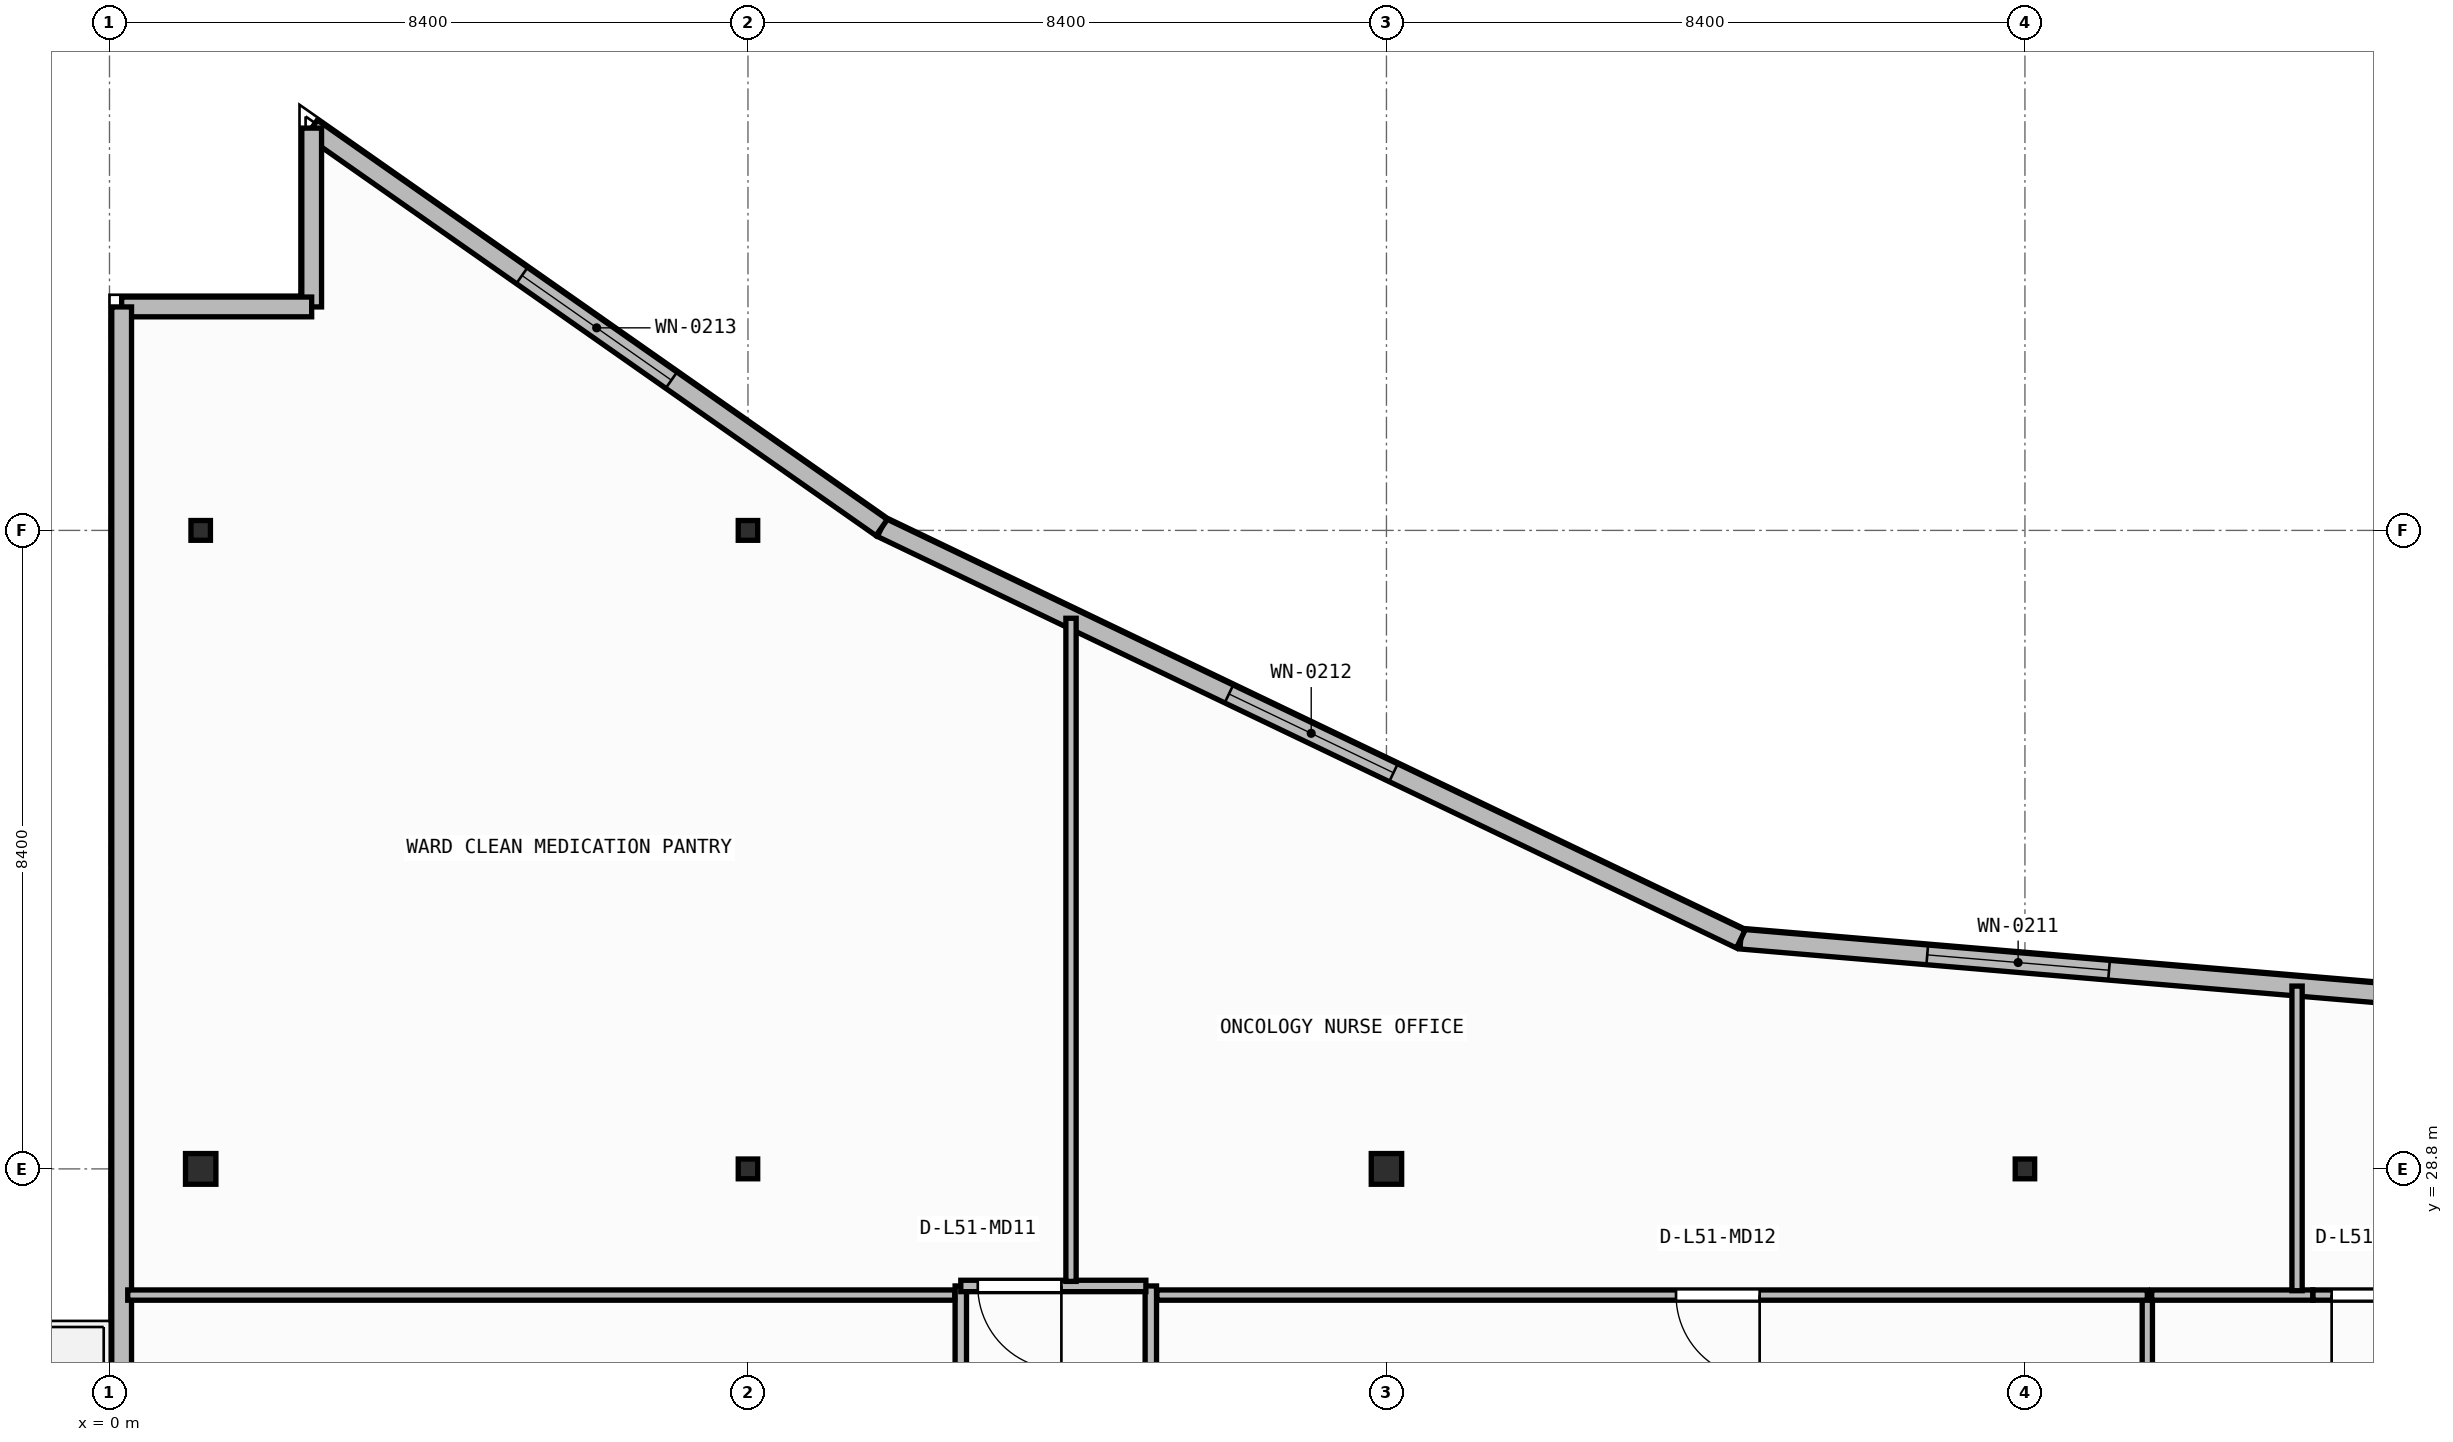
"""IFC4 building model, lengths in metres.
Left out: names, types, materials, properties, quantities, classifications, styles, units other than length and angle.
Written with IfcOpenShell. Run it as: python <this file> out.ifc"""

import sys

from ifc_helpers import new_model, si_unit, direction, frame, frame_2d, origin, origin_2d, place, context, subcontext, project, spatial, rectangle, i_section, extrude, element, fill, save


model = new_model("IFC4")
c1 = context("Model", 3, precision=1e-05, world=origin(), true_north=direction((0.0, 1.0)))
c2 = subcontext(c1, "Body", "Model", "MODEL_VIEW")
j1 = project(units=[si_unit("LENGTHUNIT", "METRE"), si_unit("PLANEANGLEUNIT", "RADIAN")], contexts=[c1])
p1 = place(None, origin())
s1 = spatial("IfcSite", under=j1, at=p1, CompositionType="ELEMENT")
p2 = place(p1, origin())
s2 = spatial("IfcBuilding", under=s1, at=p2, CompositionType="ELEMENT")
p3 = place(p2, frame((0.0, 0.0, 207.9)))
s3 = spatial("IfcBuildingStorey", under=s2, at=p3, CompositionType="ELEMENT", Elevation=207.9)
p4 = place(p3, frame((1.2, 28.8, 0.0), z_axis=(0.0, 0.0, 1.0), x_axis=(1.0, 0.0, 0.0)))
e1 = element("IfcColumn", 1, at=p4, inside=s3, PredefinedType="COLUMN", context=c2, shape_type="SweptSolid", body=[
    extrude(i_section(OverallWidth=0.4, OverallDepth=0.404, WebThickness=0.02, FlangeThickness=0.032, at=origin_2d()), origin(), (0.0, 0.0, 1.0), 3.95),
])
p5 = place(p3, frame((8.4, 28.8, 0.0), z_axis=(0.0, 0.0, 1.0), x_axis=(1.0, 0.0, 0.0)))
e2 = element("IfcColumn", 2, at=p5, inside=s3, PredefinedType="COLUMN", context=c2, shape_type="SweptSolid", body=[
    extrude(i_section(OverallWidth=0.256, OverallDepth=0.26, WebThickness=0.01, FlangeThickness=0.017, FilletRadius=0.013, at=origin_2d()), origin(), (0.0, 0.0, 1.0), 3.95),
])
p6 = place(p3, frame((16.8, 28.8, 0.0), z_axis=(0.0, 0.0, 1.0), x_axis=(1.0, 0.0, 0.0)))
e3 = element("IfcColumn", 3, at=p6, inside=s3, PredefinedType="COLUMN", context=c2, shape_type="SweptSolid", body=[
    extrude(i_section(OverallWidth=0.4, OverallDepth=0.404, WebThickness=0.02, FlangeThickness=0.032, at=origin_2d()), origin(), (0.0, 0.0, 1.0), 3.95),
])
for number, where, z_axis, x_axis in (
    (4, (25.2, 28.8, 0.0), (0.0, 0.0, 1.0), (1.0, 0.0, 0.0)),
    (5, (1.2, 37.2, 0.0), (0.0, 0.0, 1.0), (1.0, 0.0, 0.0)),
    (6, (8.4, 37.2, 0.0), (0.0, 0.0, 1.0), (1.0, 0.0, 0.0)),
):
    element("IfcColumn", number, at=place(p3, frame(where, z_axis=z_axis, x_axis=x_axis)), inside=s3, PredefinedType="COLUMN", context=c2, shape_type="SweptSolid", body=[
        extrude(i_section(OverallWidth=0.256, OverallDepth=0.26, WebThickness=0.01, FlangeThickness=0.017, FilletRadius=0.013, at=origin_2d()), origin(), (0.0, 0.0, 1.0), 3.95),
    ])
p7 = place(p3, frame((34.815, 30.696, 0.0), z_axis=(0.0, 0.0, 1.0), x_axis=(-0.996454704935, 0.084130975344, 0.0)))
e7 = element("IfcWall", 7, at=p7, inside=s3, PredefinedType="STANDARD", context=c2, shape_type="SweptSolid", body=[
    extrude(rectangle(XDim=13.401, YDim=0.26, at=frame_2d((6.701, 0.0))), origin(), (0.0, 0.0, 1.0), 3.71),
])
p8 = place(p7, frame((8.539, 0.0, 0.9)))
e8 = element("IfcOpeningElement", 8, at=p8, cuts=e7, PredefinedType="OPENING", context=c2, shape_type="SweptSolid", body=[
    extrude(rectangle(XDim=2.4, YDim=1.65, at=frame_2d((1.2, 0.825))), frame((0.0, 0.14, 0.0), z_axis=(0.0, -1.0, 0.0), x_axis=(1.0, 0.0, 0.0)), (0.0, 0.0, 1.0), 0.28),
])
p9 = place(p3, frame((21.461, 31.823, 0.0), z_axis=(0.0, 0.0, 1.0), x_axis=(-0.901858094827, 0.432032379336, 0.0)))
e9 = element("IfcWall", 9, at=p9, inside=s3, PredefinedType="STANDARD", context=c2, shape_type="SweptSolid", body=[
    extrude(rectangle(XDim=12.532, YDim=0.26, at=frame_2d((6.266, 0.0))), origin(), (0.0, 0.0, 1.0), 3.71),
])
p10 = place(p9, frame((5.066, 0.0, 0.9)))
e10 = element("IfcOpeningElement", 10, at=p10, cuts=e9, PredefinedType="OPENING", context=c2, shape_type="SweptSolid", body=[
    extrude(rectangle(XDim=2.4, YDim=1.65, at=frame_2d((1.2, 0.825))), frame((0.0, 0.14, 0.0), z_axis=(0.0, -1.0, 0.0), x_axis=(1.0, 0.0, 0.0)), (0.0, 0.0, 1.0), 0.28),
])
p11 = place(p3, frame((10.159, 37.237, 0.0), z_axis=(0.0, 0.0, 1.0), x_axis=(-0.818933702389, 0.57388813465, 0.0)))
e11 = element("IfcWall", 11, at=p11, inside=s3, PredefinedType="STANDARD", context=c2, shape_type="SweptSolid", body=[
    extrude(rectangle(XDim=9.157, YDim=0.26, at=frame_2d((4.579, 0.0))), origin(), (0.0, 0.0, 1.0), 3.71),
])
p12 = place(p11, frame((3.378, 0.0, 0.9)))
e12 = element("IfcOpeningElement", 12, at=p12, cuts=e11, PredefinedType="OPENING", context=c2, shape_type="SweptSolid", body=[
    extrude(rectangle(XDim=2.4, YDim=1.65, at=frame_2d((1.2, 0.825))), frame((0.0, 0.14, 0.0), z_axis=(0.0, -1.0, 0.0), x_axis=(1.0, 0.0, 0.0)), (0.0, 0.0, 1.0), 0.28),
])
p13 = place(p3, frame((2.66, 42.492, 0.0), z_axis=(0.0, 0.0, 1.0), x_axis=(0.0, -1.0, 0.0)))
e13 = element("IfcWall", 13, at=p13, inside=s3, PredefinedType="STANDARD", context=c2, shape_type="SweptSolid", body=[
    extrude(rectangle(XDim=2.353, YDim=0.26, at=frame_2d((1.176, 0.0))), origin(), (0.0, 0.0, 1.0), 3.71),
])
p14 = place(p3, frame((2.66, 40.14, 0.0), z_axis=(0.0, 0.0, 1.0), x_axis=(-1.0, 0.0, 0.0)))
e14 = element("IfcWall", 14, at=p14, inside=s3, PredefinedType="STANDARD", context=c2, shape_type="SweptSolid", body=[
    extrude(rectangle(XDim=2.5, YDim=0.26, at=frame_2d((1.25, 0.0))), origin(), (0.0, 0.0, 1.0), 3.71),
])
p15 = place(p3, frame((0.16, 40.14, 0.0), z_axis=(0.0, 0.0, 1.0), x_axis=(0.0, -1.0, 0.0)))
e15 = element("IfcWall", 15, at=p15, inside=s3, PredefinedType="STANDARD", context=c2, shape_type="SweptSolid", body=[
    extrude(rectangle(XDim=37.48, YDim=0.26, at=frame_2d((18.74, 0.0))), origin(), (0.0, 0.0, 1.0), 3.71),
])
p16 = place(p15, frame((13.926, 0.0, 0.0)))
e16 = element("IfcOpeningElement", 16, at=p16, cuts=e15, PredefinedType="OPENING", context=c2, shape_type="SweptSolid", body=[
    extrude(rectangle(XDim=1.3, YDim=2.15, at=frame_2d((0.65, 1.075))), frame((0.0, 0.14, 0.0), z_axis=(0.0, -1.0, 0.0), x_axis=(1.0, 0.0, 0.0)), (0.0, 0.0, 1.0), 0.28),
])
p17 = place(p3, frame((11.2, 27.26, 0.0), z_axis=(0.0, 0.0, 1.0), x_axis=(0.0, -1.0, 0.0)))
e17 = element("IfcWall", 17, at=p17, inside=s3, PredefinedType="PARTITIONING", context=c2, shape_type="SweptSolid", body=[
    extrude(rectangle(XDim=6.592, YDim=0.15, at=frame_2d((3.296, 0.0))), origin(), (0.0, 0.0, 1.0), 3.71),
])
p18 = place(p17, frame((2.746, 0.0, 0.0)))
e18 = element("IfcOpeningElement", 18, at=p18, cuts=e17, PredefinedType="OPENING", context=c2, shape_type="SweptSolid", body=[
    extrude(rectangle(XDim=1.1, YDim=2.1, at=frame_2d((0.55, 1.05))), frame((0.0, 0.085, 0.0), z_axis=(0.0, -1.0, 0.0), x_axis=(1.0, 0.0, 0.0)), (0.0, 0.0, 1.0), 0.17),
])
p19 = place(p3, frame((13.7, 20.668, 0.0), z_axis=(0.0, 0.0, 1.0), x_axis=(0.0, 1.0, 0.0)))
e19 = element("IfcWall", 19, at=p19, inside=s3, PredefinedType="PARTITIONING", context=c2, shape_type="SweptSolid", body=[
    extrude(rectangle(XDim=6.592, YDim=0.15, at=frame_2d((3.296, 0.0))), origin(), (0.0, 0.0, 1.0), 3.71),
])
p20 = place(p19, frame((2.746, 0.0, 0.0)))
e20 = element("IfcOpeningElement", 20, at=p20, cuts=e19, PredefinedType="OPENING", context=c2, shape_type="SweptSolid", body=[
    extrude(rectangle(XDim=1.1, YDim=2.1, at=frame_2d((0.55, 1.05))), frame((0.0, 0.085, 0.0), z_axis=(0.0, -1.0, 0.0), x_axis=(1.0, 0.0, 0.0)), (0.0, 0.0, 1.0), 0.17),
])
p21 = place(p3, frame((13.635, 27.26, 0.0), z_axis=(0.0, 0.0, 1.0), x_axis=(-1.0, 0.0, 0.0)))
e21 = element("IfcWall", 21, at=p21, inside=s3, PredefinedType="PARTITIONING", context=c2, shape_type="SweptSolid", body=[
    extrude(rectangle(XDim=2.435, YDim=0.15, at=frame_2d((1.218, 0.0))), origin(), (0.0, 0.0, 1.0), 3.71),
])
p22 = place(p21, frame((1.112, 0.0, 0.0)))
e22 = element("IfcOpeningElement", 22, at=p22, cuts=e21, PredefinedType="OPENING", context=c2, shape_type="SweptSolid", body=[
    extrude(rectangle(XDim=1.1, YDim=2.1, at=frame_2d((0.55, 1.05))), frame((0.0, 0.085, 0.0), z_axis=(0.0, -1.0, 0.0), x_axis=(1.0, 0.0, 0.0)), (0.0, 0.0, 1.0), 0.17),
])
p23 = place(p3, frame((11.12, 27.14, 0.0), z_axis=(0.0, 0.0, 1.0), x_axis=(-1.0, 0.0, 0.0)))
e23 = element("IfcWall", 23, at=p23, inside=s3, PredefinedType="PARTITIONING", context=c2, shape_type="SweptSolid", body=[
    extrude(rectangle(XDim=10.88, YDim=0.135, at=frame_2d((5.44, 0.0))), origin(), (0.0, 0.0, 1.0), 3.71),
])
p24 = place(p3, frame((26.81, 20.498, 0.0), z_axis=(0.0, 0.0, 1.0), x_axis=(0.0, 1.0, 0.0)))
e24 = element("IfcWall", 24, at=p24, inside=s3, PredefinedType="PARTITIONING", context=c2, shape_type="SweptSolid", body=[
    extrude(rectangle(XDim=6.642, YDim=0.135, at=frame_2d((3.321, 0.0))), origin(), (0.0, 0.0, 1.0), 3.71),
])
p25 = place(p3, frame((26.81, 27.14, 0.0), z_axis=(0.0, 0.0, 1.0), x_axis=(-1.0, 0.0, 0.0)))
e25 = element("IfcWall", 25, at=p25, inside=s3, PredefinedType="PARTITIONING", context=c2, shape_type="SweptSolid", body=[
    extrude(rectangle(XDim=13.03, YDim=0.135, at=frame_2d((6.515, 0.0))), origin(), (0.0, 0.0, 1.0), 3.71),
])
p26 = place(p25, frame((5.1, 0.0, 0.0)))
e26 = element("IfcOpeningElement", 26, at=p26, cuts=e25, PredefinedType="OPENING", context=c2, shape_type="SweptSolid", body=[
    extrude(rectangle(XDim=1.1, YDim=2.1, at=frame_2d((0.55, 1.05))), frame((0.0, 0.077, 0.0), z_axis=(0.0, -1.0, 0.0), x_axis=(1.0, 0.0, 0.0)), (0.0, 0.0, 1.0), 0.155),
])
p27 = place(p3, frame((28.988, 27.14, 0.0), z_axis=(0.0, 0.0, 1.0), x_axis=(-1.0, 0.0, 0.0)))
e27 = element("IfcWall", 27, at=p27, inside=s3, PredefinedType="PARTITIONING", context=c2, shape_type="SweptSolid", body=[
    extrude(rectangle(XDim=2.12, YDim=0.135, at=frame_2d((1.06, 0.0))), origin(), (0.0, 0.0, 1.0), 3.71),
])
p28 = place(p3, frame((32.31, 27.14, 0.0), z_axis=(0.0, 0.0, 1.0), x_axis=(-1.0, 0.0, 0.0)))
e28 = element("IfcWall", 28, at=p28, inside=s3, PredefinedType="PARTITIONING", context=c2, shape_type="SweptSolid", body=[
    extrude(rectangle(XDim=3.321, YDim=0.135, at=frame_2d((1.66, 0.0))), origin(), (0.0, 0.0, 1.0), 3.71),
])
p29 = place(p28, frame((1.975, 0.0, 0.0)))
e29 = element("IfcOpeningElement", 29, at=p29, cuts=e28, PredefinedType="OPENING", context=c2, shape_type="SweptSolid", body=[
    extrude(rectangle(XDim=1.1, YDim=2.1, at=frame_2d((0.55, 1.05))), frame((0.0, 0.077, 0.0), z_axis=(0.0, -1.0, 0.0), x_axis=(1.0, 0.0, 0.0)), (0.0, 0.0, 1.0), 0.155),
])
p30 = place(p3, frame((12.65, 27.32, 0.0), z_axis=(0.0, 0.0, 1.0), x_axis=(0.0, 1.0, 0.0)))
e30 = element("IfcWall", 30, at=p30, inside=s3, PredefinedType="PARTITIONING", context=c2, shape_type="SweptSolid", body=[
    extrude(rectangle(XDim=8.724, YDim=0.135, at=frame_2d((4.362, 0.0))), origin(), (0.0, 0.0, 1.0), 3.71),
])
p31 = place(p3, frame((28.78, 27.198, 0.0), z_axis=(0.0, 0.0, 1.0), x_axis=(0.0, 1.0, 0.0)))
e31 = element("IfcWall", 31, at=p31, inside=s3, PredefinedType="PARTITIONING", context=c2, shape_type="SweptSolid", body=[
    extrude(rectangle(XDim=4.008, YDim=0.135, at=frame_2d((2.004, 0.0))), origin(), (0.0, 0.0, 1.0), 3.71),
])
p32 = place(p8, origin())
e32 = element("IfcWindow", 32, at=p32, inside=s3, PartitioningType="SINGLE_PANEL", PredefinedType="WINDOW", context=c2, shape_type="SweptSolid", body=[
    extrude(rectangle(XDim=2.4, YDim=1.65, at=frame_2d((1.2, 0.825))), frame((0.0, 0.03, 0.0), z_axis=(0.0, -1.0, 0.0), x_axis=(1.0, 0.0, 0.0)), (0.0, 0.0, 1.0), 0.06),
])
fill(e8, e32)
p33 = place(p10, origin())
e33 = element("IfcWindow", 33, at=p33, inside=s3, PartitioningType="SINGLE_PANEL", PredefinedType="WINDOW", context=c2, shape_type="SweptSolid", body=[
    extrude(rectangle(XDim=2.4, YDim=1.65, at=frame_2d((1.2, 0.825))), frame((0.0, 0.03, 0.0), z_axis=(0.0, -1.0, 0.0), x_axis=(1.0, 0.0, 0.0)), (0.0, 0.0, 1.0), 0.06),
])
fill(e10, e33)
p34 = place(p12, origin())
e34 = element("IfcWindow", 34, at=p34, inside=s3, PartitioningType="SINGLE_PANEL", PredefinedType="WINDOW", context=c2, shape_type="SweptSolid", body=[
    extrude(rectangle(XDim=2.4, YDim=1.65, at=frame_2d((1.2, 0.825))), frame((0.0, 0.03, 0.0), z_axis=(0.0, -1.0, 0.0), x_axis=(1.0, 0.0, 0.0)), (0.0, 0.0, 1.0), 0.06),
])
fill(e12, e34)
p35 = place(p22, origin())
e35 = element("IfcDoor", 35, at=p35, inside=s3, OperationType="SINGLE_SWING_LEFT", PredefinedType="DOOR", context=c2, shape_type="SweptSolid", body=[
    extrude(rectangle(XDim=1.1, YDim=2.1, at=frame_2d((0.55, 1.05))), frame((0.0, 0.025, 0.0), z_axis=(0.0, -1.0, 0.0), x_axis=(1.0, 0.0, 0.0)), (0.0, 0.0, 1.0), 0.05),
])
fill(e22, e35)
p36 = place(p26, origin())
e36 = element("IfcDoor", 36, at=p36, inside=s3, OperationType="SINGLE_SWING_LEFT", PredefinedType="DOOR", context=c2, shape_type="SweptSolid", body=[
    extrude(rectangle(XDim=1.1, YDim=2.1, at=frame_2d((0.55, 1.05))), frame((0.0, 0.025, 0.0), z_axis=(0.0, -1.0, 0.0), x_axis=(1.0, 0.0, 0.0)), (0.0, 0.0, 1.0), 0.05),
])
fill(e26, e36)
p37 = place(p29, origin())
e37 = element("IfcDoor", 37, at=p37, inside=s3, OperationType="SINGLE_SWING_RIGHT", PredefinedType="DOOR", context=c2, shape_type="SweptSolid", body=[
    extrude(rectangle(XDim=1.1, YDim=2.1, at=frame_2d((0.55, 1.05))), frame((0.0, 0.025, 0.0), z_axis=(0.0, -1.0, 0.0), x_axis=(1.0, 0.0, 0.0)), (0.0, 0.0, 1.0), 0.05),
])
fill(e29, e37)
save(model, sys.argv[1])
